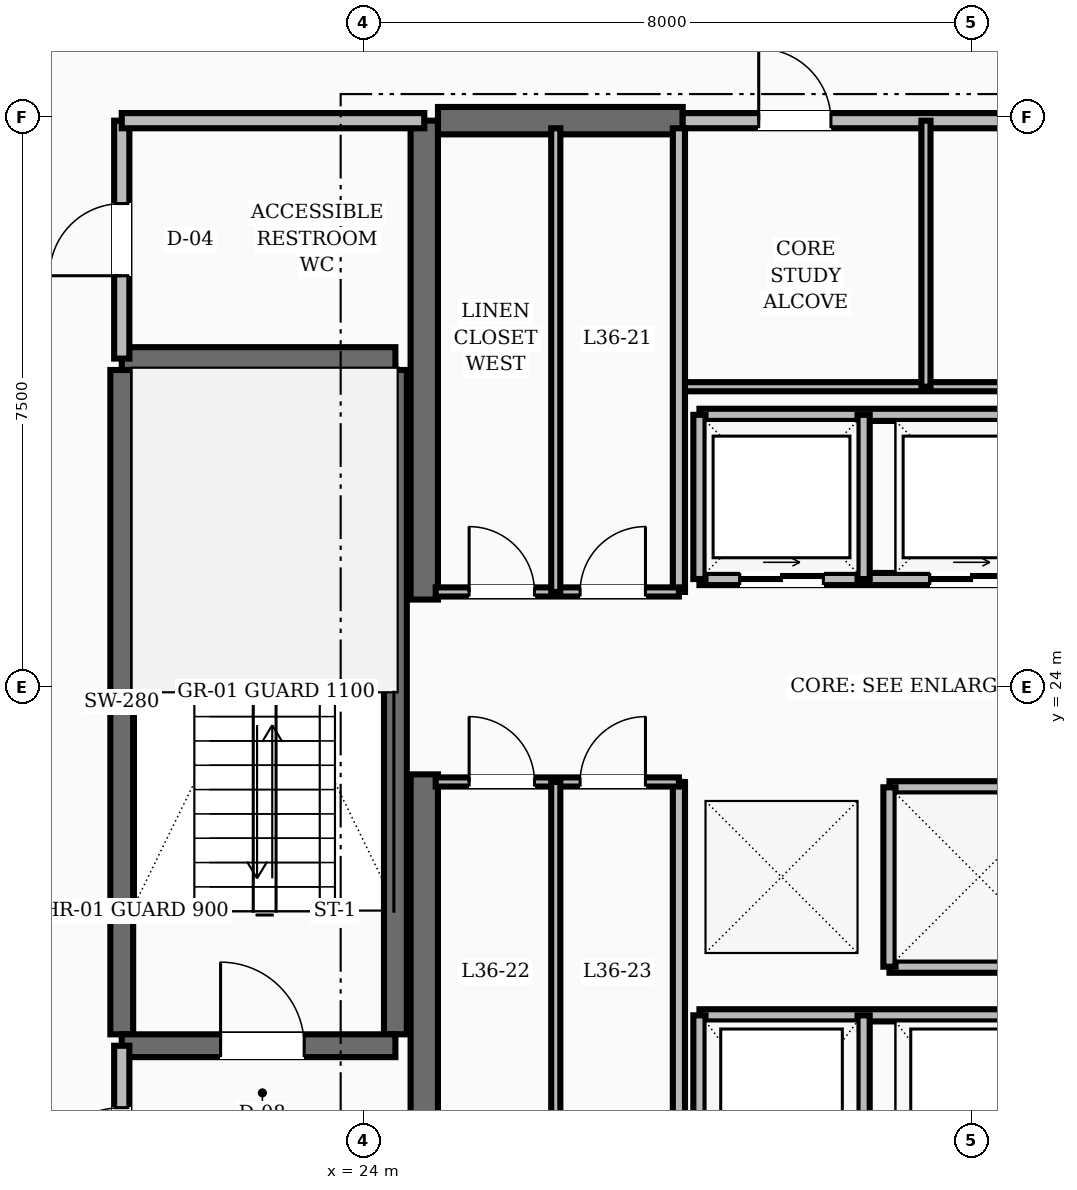
"""IFC4 building model, lengths in metres.
Left out: names, types, materials, properties, quantities, classifications, styles, units other than length and angle.
Written with IfcOpenShell. Run it as: python <this file> out.ifc"""

import sys

from ifc_helpers import new_model, si_unit, direction, frame, frame_2d, origin, place, context, subcontext, project, spatial, rectangle, extrude, element, fill, save


model = new_model("IFC4")
c1 = context("Model", 3, precision=1e-05, world=origin(), true_north=direction((0.0, 1.0)))
c2 = subcontext(c1, "Body", "Model", "MODEL_VIEW")
j1 = project(units=[si_unit("LENGTHUNIT", "METRE"), si_unit("PLANEANGLEUNIT", "RADIAN")], contexts=[c1])
p1 = place(None, origin())
s1 = spatial("IfcSite", under=j1, at=p1, CompositionType="ELEMENT")
p2 = place(p1, origin())
s2 = spatial("IfcBuilding", under=s1, at=p2, CompositionType="ELEMENT")
p3 = place(p2, frame((0.0, 0.0, 142.4)))
s3 = spatial("IfcBuildingStorey", under=s2, at=p3, CompositionType="ELEMENT", Elevation=142.4)
for number, where, z_axis, x_axis in (
    (1, (24.8, 16.55, 0.0), (0.0, 0.0, 1.0), (0.0, 1.0, 0.0)),
    (2, (24.8, 25.15, 0.0), (0.0, 0.0, 1.0), (0.0, 1.0, 0.0)),
):
    element("IfcWall", number, at=place(p3, frame(where, z_axis=z_axis, x_axis=x_axis)), inside=s3, PredefinedType="SHEAR", context=c2, shape_type="SweptSolid", body=[
        extrude(rectangle(XDim=6.3, YDim=0.36, at=frame_2d((3.15, 0.0))), origin(), (0.0, 0.0, 1.0), 3.6),
    ])
p4 = place(p3, frame((24.98, 31.45, 0.0), z_axis=(0.0, 0.0, 1.0), x_axis=(1.0, 0.0, 0.0)))
e3 = element("IfcWall", 3, at=p4, inside=s3, PredefinedType="SHEAR", context=c2, shape_type="SweptSolid", body=[
    extrude(rectangle(XDim=3.22, YDim=0.36, at=frame_2d((1.61, 0.0))), origin(), (0.0, 0.0, 1.0), 3.6),
])
for number, where, z_axis, x_axis in (
    (4, (20.82, 19.43, 0.0), (0.0, 0.0, 1.0), (0.0, 1.0, 0.0)),
    (5, (24.42, 19.43, 0.0), (0.0, 0.0, 1.0), (0.0, 1.0, 0.0)),
):
    element("IfcWall", number, at=place(p3, frame(where, z_axis=z_axis, x_axis=x_axis)), inside=s3, PredefinedType="SHEAR", context=c2, shape_type="SweptSolid", body=[
        extrude(rectangle(XDim=8.74, YDim=0.3, at=frame_2d((4.37, 0.0))), origin(), (0.0, 0.0, 1.0), 3.6),
    ])
p5 = place(p3, frame((20.82, 19.28, 0.0), z_axis=(0.0, 0.0, 1.0), x_axis=(1.0, 0.0, 0.0)))
e6 = element("IfcWall", 6, at=p5, inside=s3, PredefinedType="SHEAR", context=c2, shape_type="SweptSolid", body=[
    extrude(rectangle(XDim=3.6, YDim=0.3, at=frame_2d((1.8, 0.0))), origin(), (0.0, 0.0, 1.0), 3.6),
])
p6 = place(p5, frame((1.3, 0.0, 0.0)))
e7 = element("IfcOpeningElement", 7, at=p6, cuts=e6, PredefinedType="OPENING", context=c2, shape_type="SweptSolid", body=[
    extrude(rectangle(XDim=1.1, YDim=2.1, at=frame_2d((0.55, 1.05))), frame((0.0, 0.16, 0.0), z_axis=(0.0, -1.0, 0.0), x_axis=(1.0, 0.0, 0.0)), (0.0, 0.0, 1.0), 0.32),
])
p7 = place(p3, frame((20.82, 28.32, 0.0), z_axis=(0.0, 0.0, 1.0), x_axis=(1.0, 0.0, 0.0)))
e8 = element("IfcWall", 8, at=p7, inside=s3, PredefinedType="SHEAR", context=c2, shape_type="SweptSolid", body=[
    extrude(rectangle(XDim=3.6, YDim=0.3, at=frame_2d((1.8, 0.0))), origin(), (0.0, 0.0, 1.0), 3.6),
])
p8 = place(p3, frame((20.82, 16.55, 0.0), z_axis=(0.0, 0.0, 1.0), x_axis=(0.0, 1.0, 0.0)))
e9 = element("IfcWall", 9, at=p8, inside=s3, PredefinedType="SOLIDWALL", context=c2, shape_type="SweptSolid", body=[
    extrude(rectangle(XDim=2.73, YDim=0.2, at=frame_2d((1.365, 0.0))), origin(), (0.0, 0.0, 1.0), 2.8),
])
p9 = place(p8, frame((0.815, 0.0, 0.0)))
e10 = element("IfcOpeningElement", 10, at=p9, cuts=e9, PredefinedType="OPENING", context=c2, shape_type="SweptSolid", body=[
    extrude(rectangle(XDim=1.1, YDim=2.1, at=frame_2d((0.55, 1.05))), frame((0.0, 0.11, 0.0), z_axis=(0.0, -1.0, 0.0), x_axis=(1.0, 0.0, 0.0)), (0.0, 0.0, 1.0), 0.22),
])
p10 = place(p3, frame((20.82, 28.32, 0.0), z_axis=(0.0, 0.0, 1.0), x_axis=(0.0, 1.0, 0.0)))
e11 = element("IfcWall", 11, at=p10, inside=s3, PredefinedType="SOLIDWALL", context=c2, shape_type="SweptSolid", body=[
    extrude(rectangle(XDim=3.13, YDim=0.2, at=frame_2d((1.565, 0.0))), origin(), (0.0, 0.0, 1.0), 2.8),
])
p11 = place(p10, frame((1.09, 0.0, 0.0)))
e12 = element("IfcOpeningElement", 12, at=p11, cuts=e11, PredefinedType="OPENING", context=c2, shape_type="SweptSolid", body=[
    extrude(rectangle(XDim=0.95, YDim=2.1, at=frame_2d((0.475, 1.05))), frame((0.0, 0.11, 0.0), z_axis=(0.0, -1.0, 0.0), x_axis=(1.0, 0.0, 0.0)), (0.0, 0.0, 1.0), 0.22),
])
p12 = place(p3, frame((20.82, 31.45, 0.0), z_axis=(0.0, 0.0, 1.0), x_axis=(1.0, 0.0, 0.0)))
e13 = element("IfcWall", 13, at=p12, inside=s3, PredefinedType="SOLIDWALL", context=c2, shape_type="SweptSolid", body=[
    extrude(rectangle(XDim=3.98, YDim=0.2, at=frame_2d((1.99, 0.0))), origin(), (0.0, 0.0, 1.0), 2.8),
])
p13 = place(p3, frame((28.42, 25.42, 0.0), z_axis=(0.0, 0.0, 1.0), x_axis=(1.0, 0.0, 0.0)))
e14 = element("IfcWall", 14, at=p13, inside=s3, PredefinedType="SOLIDWALL", context=c2, shape_type="SweptSolid", body=[
    extrude(rectangle(XDim=4.66, YDim=0.16, at=frame_2d((2.33, 0.0))), origin(), (0.0, 0.0, 1.0), 2.8),
])
p14 = place(p13, frame((0.53, 0.0, 0.0)))
e15 = element("IfcOpeningElement", 15, at=p14, cuts=e14, PredefinedType="OPENING", context=c2, shape_type="SweptSolid", body=[
    extrude(rectangle(XDim=1.1, YDim=2.15, at=frame_2d((0.55, 1.075))), frame((0.0, 0.09, 0.0), z_axis=(0.0, -1.0, 0.0), x_axis=(1.0, 0.0, 0.0)), (0.0, 0.0, 1.0), 0.18),
])
p15 = place(p13, frame((3.03, 0.0, 0.0)))
e16 = element("IfcOpeningElement", 16, at=p15, cuts=e14, PredefinedType="OPENING", context=c2, shape_type="SweptSolid", body=[
    extrude(rectangle(XDim=1.1, YDim=2.15, at=frame_2d((0.55, 1.075))), frame((0.0, 0.09, 0.0), z_axis=(0.0, -1.0, 0.0), x_axis=(1.0, 0.0, 0.0)), (0.0, 0.0, 1.0), 0.18),
])
p16 = place(p3, frame((28.42, 27.58, 0.0), z_axis=(0.0, 0.0, 1.0), x_axis=(1.0, 0.0, 0.0)))
e17 = element("IfcWall", 17, at=p16, inside=s3, PredefinedType="SOLIDWALL", context=c2, shape_type="SweptSolid", body=[
    extrude(rectangle(XDim=4.66, YDim=0.16, at=frame_2d((2.33, 0.0))), origin(), (0.0, 0.0, 1.0), 2.8),
])
for number, where, z_axis, x_axis in (
    (18, (28.42, 25.42, 0.0), (0.0, 0.0, 1.0), (0.0, 1.0, 0.0)),
    (19, (30.58, 25.42, 0.0), (0.0, 0.0, 1.0), (0.0, 1.0, 0.0)),
):
    element("IfcWall", number, at=place(p3, frame(where, z_axis=z_axis, x_axis=x_axis)), inside=s3, PredefinedType="SOLIDWALL", context=c2, shape_type="SweptSolid", body=[
        extrude(rectangle(XDim=2.16, YDim=0.16, at=frame_2d((1.08, 0.0))), origin(), (0.0, 0.0, 1.0), 2.8),
    ])
for number, where, z_axis, x_axis in (
    (20, (30.92, 22.68, 0.0), (0.0, 0.0, 1.0), (1.0, 0.0, 0.0)),
    (21, (30.92, 20.32, 0.0), (0.0, 0.0, 1.0), (1.0, 0.0, 0.0)),
):
    element("IfcWall", number, at=place(p3, frame(where, z_axis=z_axis, x_axis=x_axis)), inside=s3, PredefinedType="SOLIDWALL", context=c2, shape_type="SweptSolid", body=[
        extrude(rectangle(XDim=4.76, YDim=0.16, at=frame_2d((2.38, 0.0))), origin(), (0.0, 0.0, 1.0), 2.8),
    ])
p17 = place(p3, frame((30.92, 20.32, 0.0), z_axis=(0.0, 0.0, 1.0), x_axis=(0.0, 1.0, 0.0)))
e22 = element("IfcWall", 22, at=p17, inside=s3, PredefinedType="SOLIDWALL", context=c2, shape_type="SweptSolid", body=[
    extrude(rectangle(XDim=2.36, YDim=0.16, at=frame_2d((1.18, 0.0))), origin(), (0.0, 0.0, 1.0), 2.8),
])
p18 = place(p3, frame((28.42, 19.68, 0.0), z_axis=(0.0, 0.0, 1.0), x_axis=(1.0, 0.0, 0.0)))
e23 = element("IfcWall", 23, at=p18, inside=s3, PredefinedType="SOLIDWALL", context=c2, shape_type="SweptSolid", body=[
    extrude(rectangle(XDim=7.16, YDim=0.16, at=frame_2d((3.58, 0.0))), origin(), (0.0, 0.0, 1.0), 2.8),
])
for number, where, z_axis, x_axis in (
    (24, (28.42, 16.92, 0.0), (0.0, 0.0, 1.0), (0.0, 1.0, 0.0)),
    (25, (30.58, 16.92, 0.0), (0.0, 0.0, 1.0), (0.0, 1.0, 0.0)),
):
    element("IfcWall", number, at=place(p3, frame(where, z_axis=z_axis, x_axis=x_axis)), inside=s3, PredefinedType="SOLIDWALL", context=c2, shape_type="SweptSolid", body=[
        extrude(rectangle(XDim=2.76, YDim=0.16, at=frame_2d((1.38, 0.0))), origin(), (0.0, 0.0, 1.0), 2.8),
    ])
p19 = place(p3, frame((28.2, 31.45, 0.0), z_axis=(0.0, 0.0, 1.0), x_axis=(1.0, 0.0, 0.0)))
e26 = element("IfcWall", 26, at=p19, inside=s3, PredefinedType="SOLIDWALL", context=c2, shape_type="SweptSolid", body=[
    extrude(rectangle(XDim=7.6, YDim=0.2, at=frame_2d((3.8, 0.0))), origin(), (0.0, 0.0, 1.0), 2.8),
])
p20 = place(p19, frame((1.0, 0.0, 0.0)))
e27 = element("IfcOpeningElement", 27, at=p20, cuts=e26, PredefinedType="OPENING", context=c2, shape_type="SweptSolid", body=[
    extrude(rectangle(XDim=0.95, YDim=2.1, at=frame_2d((0.475, 1.05))), frame((0.0, 0.11, 0.0), z_axis=(0.0, -1.0, 0.0), x_axis=(1.0, 0.0, 0.0)), (0.0, 0.0, 1.0), 0.22),
])
p21 = place(p3, frame((28.2, 27.95, 0.0), z_axis=(0.0, 0.0, 1.0), x_axis=(1.0, 0.0, 0.0)))
e28 = element("IfcWall", 28, at=p21, inside=s3, PredefinedType="PARTITIONING", context=c2, shape_type="SweptSolid", body=[
    extrude(rectangle(XDim=7.6, YDim=0.12, at=frame_2d((3.8, 0.0))), origin(), (0.0, 0.0, 1.0), 2.8),
])
p22 = place(p3, frame((31.4, 27.95, 0.0), z_axis=(0.0, 0.0, 1.0), x_axis=(0.0, 1.0, 0.0)))
e29 = element("IfcWall", 29, at=p22, inside=s3, PredefinedType="PARTITIONING", context=c2, shape_type="SweptSolid", body=[
    extrude(rectangle(XDim=3.5, YDim=0.12, at=frame_2d((1.75, 0.0))), origin(), (0.0, 0.0, 1.0), 2.8),
])
p23 = place(p3, frame((28.15, 16.7, 0.0), z_axis=(0.0, 0.0, 1.0), x_axis=(0.0, 1.0, 0.0)))
e30 = element("IfcWall", 30, at=p23, inside=s3, PredefinedType="SOLIDWALL", context=c2, shape_type="SweptSolid", body=[
    extrude(rectangle(XDim=6.05, YDim=0.16, at=frame_2d((3.025, 0.0))), origin(), (0.0, 0.0, 1.0), 2.8),
])
p24 = place(p3, frame((28.15, 25.25, 0.0), z_axis=(0.0, 0.0, 1.0), x_axis=(0.0, 1.0, 0.0)))
e31 = element("IfcWall", 31, at=p24, inside=s3, PredefinedType="SOLIDWALL", context=c2, shape_type="SweptSolid", body=[
    extrude(rectangle(XDim=6.1, YDim=0.16, at=frame_2d((3.05, 0.0))), origin(), (0.0, 0.0, 1.0), 2.8),
])
p25 = place(p3, frame((24.95, 25.25, 0.0), z_axis=(0.0, 0.0, 1.0), x_axis=(1.0, 0.0, 0.0)))
e32 = element("IfcWall", 32, at=p25, inside=s3, PredefinedType="PARTITIONING", context=c2, shape_type="SweptSolid", body=[
    extrude(rectangle(XDim=3.2, YDim=0.12, at=frame_2d((1.6, 0.0))), origin(), (0.0, 0.0, 1.0), 2.8),
])
p26 = place(p25, frame((0.44, 0.0, 0.0)))
e33 = element("IfcOpeningElement", 33, at=p26, cuts=e32, PredefinedType="OPENING", context=c2, shape_type="SweptSolid", body=[
    extrude(rectangle(XDim=0.86, YDim=2.1, at=frame_2d((0.43, 1.05))), frame((0.0, 0.07, 0.0), z_axis=(0.0, -1.0, 0.0), x_axis=(1.0, 0.0, 0.0)), (0.0, 0.0, 1.0), 0.14),
])
p27 = place(p25, frame((1.9, 0.0, 0.0)))
e34 = element("IfcOpeningElement", 34, at=p27, cuts=e32, PredefinedType="OPENING", context=c2, shape_type="SweptSolid", body=[
    extrude(rectangle(XDim=0.86, YDim=2.1, at=frame_2d((0.43, 1.05))), frame((0.0, 0.07, 0.0), z_axis=(0.0, -1.0, 0.0), x_axis=(1.0, 0.0, 0.0)), (0.0, 0.0, 1.0), 0.14),
])
p28 = place(p3, frame((24.95, 22.75, 0.0), z_axis=(0.0, 0.0, 1.0), x_axis=(1.0, 0.0, 0.0)))
e35 = element("IfcWall", 35, at=p28, inside=s3, PredefinedType="PARTITIONING", context=c2, shape_type="SweptSolid", body=[
    extrude(rectangle(XDim=3.2, YDim=0.12, at=frame_2d((1.6, 0.0))), origin(), (0.0, 0.0, 1.0), 2.8),
])
p29 = place(p28, frame((0.44, 0.0, 0.0)))
e36 = element("IfcOpeningElement", 36, at=p29, cuts=e35, PredefinedType="OPENING", context=c2, shape_type="SweptSolid", body=[
    extrude(rectangle(XDim=0.86, YDim=2.1, at=frame_2d((0.43, 1.05))), frame((0.0, 0.07, 0.0), z_axis=(0.0, -1.0, 0.0), x_axis=(1.0, 0.0, 0.0)), (0.0, 0.0, 1.0), 0.14),
])
p30 = place(p28, frame((1.9, 0.0, 0.0)))
e37 = element("IfcOpeningElement", 37, at=p30, cuts=e35, PredefinedType="OPENING", context=c2, shape_type="SweptSolid", body=[
    extrude(rectangle(XDim=0.86, YDim=2.1, at=frame_2d((0.43, 1.05))), frame((0.0, 0.07, 0.0), z_axis=(0.0, -1.0, 0.0), x_axis=(1.0, 0.0, 0.0)), (0.0, 0.0, 1.0), 0.14),
])
p31 = place(p3, frame((26.53, 25.25, 0.0), z_axis=(0.0, 0.0, 1.0), x_axis=(0.0, 1.0, 0.0)))
e38 = element("IfcWall", 38, at=p31, inside=s3, PredefinedType="PARTITIONING", context=c2, shape_type="SweptSolid", body=[
    extrude(rectangle(XDim=6.1, YDim=0.12, at=frame_2d((3.05, 0.0))), origin(), (0.0, 0.0, 1.0), 2.8),
])
p32 = place(p3, frame((26.53, 18.3, 0.0), z_axis=(0.0, 0.0, 1.0), x_axis=(0.0, 1.0, 0.0)))
e39 = element("IfcWall", 39, at=p32, inside=s3, PredefinedType="PARTITIONING", context=c2, shape_type="SweptSolid", body=[
    extrude(rectangle(XDim=4.45, YDim=0.12, at=frame_2d((2.225, 0.0))), origin(), (0.0, 0.0, 1.0), 2.8),
])
p33 = place(p6, origin())
e40 = element("IfcDoor", 40, at=p33, inside=s3, OperationType="SINGLE_SWING_LEFT", PredefinedType="DOOR", context=c2, shape_type="SweptSolid", body=[
    extrude(rectangle(XDim=1.1, YDim=2.1, at=frame_2d((0.55, 1.05))), frame((0.0, 0.025, 0.0), z_axis=(0.0, -1.0, 0.0), x_axis=(1.0, 0.0, 0.0)), (0.0, 0.0, 1.0), 0.05),
])
fill(e7, e40)
p34 = place(p9, origin())
e41 = element("IfcDoor", 41, at=p34, inside=s3, OperationType="SINGLE_SWING_LEFT", PredefinedType="DOOR", context=c2, shape_type="SweptSolid", body=[
    extrude(rectangle(XDim=1.1, YDim=2.1, at=frame_2d((0.55, 1.05))), frame((0.0, 0.025, 0.0), z_axis=(0.0, -1.0, 0.0), x_axis=(1.0, 0.0, 0.0)), (0.0, 0.0, 1.0), 0.05),
])
fill(e10, e41)
p35 = place(p11, origin())
e42 = element("IfcDoor", 42, at=p35, inside=s3, OperationType="SINGLE_SWING_LEFT", PredefinedType="DOOR", context=c2, shape_type="SweptSolid", body=[
    extrude(rectangle(XDim=0.95, YDim=2.1, at=frame_2d((0.475, 1.05))), frame((0.0, 0.025, 0.0), z_axis=(0.0, -1.0, 0.0), x_axis=(1.0, 0.0, 0.0)), (0.0, 0.0, 1.0), 0.05),
])
fill(e12, e42)
p36 = place(p14, origin())
e43 = element("IfcDoor", 43, at=p36, inside=s3, OperationType="SLIDING_TO_RIGHT", PredefinedType="DOOR", context=c2, shape_type="SweptSolid", body=[
    extrude(rectangle(XDim=1.1, YDim=2.15, at=frame_2d((0.55, 1.075))), frame((0.0, 0.025, 0.0), z_axis=(0.0, -1.0, 0.0), x_axis=(1.0, 0.0, 0.0)), (0.0, 0.0, 1.0), 0.05),
])
fill(e15, e43)
p37 = place(p15, origin())
e44 = element("IfcDoor", 44, at=p37, inside=s3, OperationType="SLIDING_TO_RIGHT", PredefinedType="DOOR", context=c2, shape_type="SweptSolid", body=[
    extrude(rectangle(XDim=1.1, YDim=2.15, at=frame_2d((0.55, 1.075))), frame((0.0, 0.025, 0.0), z_axis=(0.0, -1.0, 0.0), x_axis=(1.0, 0.0, 0.0)), (0.0, 0.0, 1.0), 0.05),
])
fill(e16, e44)
p38 = place(p20, origin())
e45 = element("IfcDoor", 45, at=p38, inside=s3, OperationType="SINGLE_SWING_LEFT", PredefinedType="DOOR", context=c2, shape_type="SweptSolid", body=[
    extrude(rectangle(XDim=0.95, YDim=2.1, at=frame_2d((0.475, 1.05))), frame((0.0, 0.025, 0.0), z_axis=(0.0, -1.0, 0.0), x_axis=(1.0, 0.0, 0.0)), (0.0, 0.0, 1.0), 0.05),
])
fill(e27, e45)
p39 = place(p26, origin())
e46 = element("IfcDoor", 46, at=p39, inside=s3, OperationType="SINGLE_SWING_LEFT", PredefinedType="DOOR", context=c2, shape_type="SweptSolid", body=[
    extrude(rectangle(XDim=0.86, YDim=2.1, at=frame_2d((0.43, 1.05))), frame((0.0, 0.025, 0.0), z_axis=(0.0, -1.0, 0.0), x_axis=(1.0, 0.0, 0.0)), (0.0, 0.0, 1.0), 0.05),
])
fill(e33, e46)
p40 = place(p27, origin())
e47 = element("IfcDoor", 47, at=p40, inside=s3, OperationType="SINGLE_SWING_RIGHT", PredefinedType="DOOR", context=c2, shape_type="SweptSolid", body=[
    extrude(rectangle(XDim=0.86, YDim=2.1, at=frame_2d((0.43, 1.05))), frame((0.0, 0.025, 0.0), z_axis=(0.0, -1.0, 0.0), x_axis=(1.0, 0.0, 0.0)), (0.0, 0.0, 1.0), 0.05),
])
fill(e34, e47)
p41 = place(p29, origin())
e48 = element("IfcDoor", 48, at=p41, inside=s3, OperationType="SINGLE_SWING_LEFT", PredefinedType="DOOR", context=c2, shape_type="SweptSolid", body=[
    extrude(rectangle(XDim=0.86, YDim=2.1, at=frame_2d((0.43, 1.05))), frame((0.0, 0.025, 0.0), z_axis=(0.0, -1.0, 0.0), x_axis=(1.0, 0.0, 0.0)), (0.0, 0.0, 1.0), 0.05),
])
fill(e36, e48)
p42 = place(p30, origin())
e49 = element("IfcDoor", 49, at=p42, inside=s3, OperationType="SINGLE_SWING_RIGHT", PredefinedType="DOOR", context=c2, shape_type="SweptSolid", body=[
    extrude(rectangle(XDim=0.86, YDim=2.1, at=frame_2d((0.43, 1.05))), frame((0.0, 0.025, 0.0), z_axis=(0.0, -1.0, 0.0), x_axis=(1.0, 0.0, 0.0)), (0.0, 0.0, 1.0), 0.05),
])
fill(e37, e49)
save(model, sys.argv[1])
